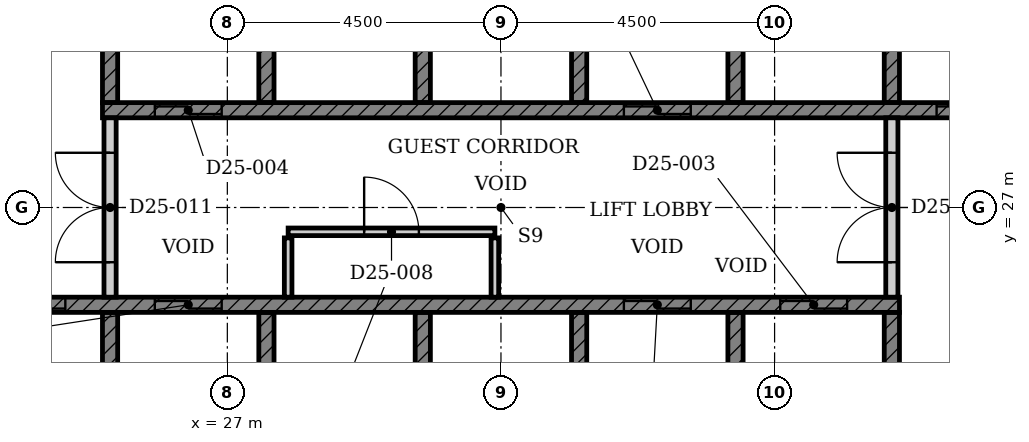
"""IFC4 building model, lengths in metres.
Left out: names, types, materials, properties, quantities, classifications, styles, units other than length and angle.
Written with IfcOpenShell. Run it as: python <this file> out.ifc"""

import sys

from ifc_helpers import new_model, si_unit, direction, frame, frame_2d, origin, place, context, subcontext, project, spatial, polyline, rectangle, outline, extrude, element, fill, save


model = new_model("IFC4")
c1 = context("Model", 3, precision=1e-05, world=origin(), true_north=direction((0.0, 1.0)))
c2 = subcontext(c1, "Body", "Model", "MODEL_VIEW")
j1 = project(units=[si_unit("LENGTHUNIT", "METRE"), si_unit("PLANEANGLEUNIT", "RADIAN")], contexts=[c1])
p1 = place(None, origin())
s1 = spatial("IfcSite", under=j1, at=p1, CompositionType="ELEMENT")
p2 = place(p1, origin())
s2 = spatial("IfcBuilding", under=s1, at=p2, CompositionType="ELEMENT")
p3 = place(p2, frame((0.0, 0.0, 104.4)))
s3 = spatial("IfcBuildingStorey", under=s2, at=p3, CompositionType="ELEMENT", Elevation=104.4)
p4 = place(p3, origin())
e1 = element("IfcWall", 1, at=p4, inside=s3, PredefinedType="SHEAR", context=c2, shape_type="SweptSolid", body=[
    extrude(outline(polyline([(22.375, 22.35), (38.053, 22.35), (38.053, 25.275), (37.803, 25.275), (37.803, 22.65), (35.482, 22.65), (35.482, 25.275), (35.232, 25.275), (35.232, 22.65), (32.911, 22.65), (32.911, 25.275), (32.661, 25.275), (32.661, 22.65), (30.339, 22.65), (30.339, 25.275), (30.089, 25.275), (30.089, 22.65), (27.768, 22.65), (27.768, 25.275), (27.518, 25.275), (27.518, 22.65), (25.197, 22.65), (25.197, 25.275), (24.947, 25.275), (24.947, 22.65), (22.625, 22.65), (22.625, 25.275), (22.375, 25.275), (22.375, 22.35)])), origin(), (0.0, 0.0, 1.0), 3.3),
])
p5 = place(p3, origin())
e2 = element("IfcWall", 2, at=p5, inside=s3, PredefinedType="SHEAR", context=c2, shape_type="SweptSolid", body=[
    extrude(outline(polyline([(24.947, 28.725), (25.197, 28.725), (25.197, 31.35), (27.518, 31.35), (27.518, 28.725), (27.768, 28.725), (27.768, 31.35), (30.089, 31.35), (30.089, 28.725), (30.339, 28.725), (30.339, 31.35), (32.661, 31.35), (32.661, 28.725), (32.911, 28.725), (32.911, 31.35), (35.232, 31.35), (35.232, 28.725), (35.482, 28.725), (35.482, 31.35), (37.803, 31.35), (37.803, 28.725), (38.053, 28.725), (38.053, 31.35), (40.375, 31.35), (40.375, 28.725), (40.625, 28.725), (40.625, 31.65), (24.947, 31.65), (24.947, 28.725)])), origin(), (0.0, 0.0, 1.0), 3.3),
])
p6 = place(p3, frame((22.375, 25.4, 0.0), z_axis=(0.0, 0.0, 1.0), x_axis=(1.0, 0.0, 0.0)))
e3 = element("IfcWall", 3, at=p6, inside=s3, PredefinedType="SHEAR", context=c2, shape_type="SweptSolid", body=[
    extrude(rectangle(XDim=15.678, YDim=0.25, at=frame_2d((7.839, 0.0))), origin(), (0.0, 0.0, 1.0), 3.3),
])
p7 = place(p6, frame((3.432, 0.0, 0.0)))
e4 = element("IfcOpeningElement", 4, at=p7, cuts=e3, PredefinedType="OPENING", context=c2, shape_type="SweptSolid", body=[
    extrude(rectangle(XDim=1.1, YDim=2.1, at=frame_2d((0.55, 1.05))), frame((0.0, 0.135, 0.0), z_axis=(0.0, -1.0, 0.0), x_axis=(1.0, 0.0, 0.0)), (0.0, 0.0, 1.0), 0.27),
])
p8 = place(p6, frame((11.146, 0.0, 0.0)))
e5 = element("IfcOpeningElement", 5, at=p8, cuts=e3, PredefinedType="OPENING", context=c2, shape_type="SweptSolid", body=[
    extrude(rectangle(XDim=1.1, YDim=2.1, at=frame_2d((0.55, 1.05))), frame((0.0, 0.135, 0.0), z_axis=(0.0, -1.0, 0.0), x_axis=(1.0, 0.0, 0.0)), (0.0, 0.0, 1.0), 0.27),
])
p9 = place(p6, frame((13.718, 0.0, 0.0)))
e6 = element("IfcOpeningElement", 6, at=p9, cuts=e3, PredefinedType="OPENING", context=c2, shape_type="SweptSolid", body=[
    extrude(rectangle(XDim=1.1, YDim=2.1, at=frame_2d((0.55, 1.05))), frame((0.0, 0.135, 0.0), z_axis=(0.0, -1.0, 0.0), x_axis=(1.0, 0.0, 0.0)), (0.0, 0.0, 1.0), 0.27),
])
p10 = place(p6, frame((0.861, 0.0, 0.0)))
e7 = element("IfcOpeningElement", 7, at=p10, cuts=e3, PredefinedType="OPENING", context=c2, shape_type="SweptSolid", body=[
    extrude(rectangle(XDim=1.1, YDim=2.1, at=frame_2d((0.55, 1.05))), frame((0.0, 0.135, 0.0), z_axis=(0.0, -1.0, 0.0), x_axis=(1.0, 0.0, 0.0)), (0.0, 0.0, 1.0), 0.27),
])
p11 = place(p3, frame((24.947, 28.6, 0.0), z_axis=(0.0, 0.0, 1.0), x_axis=(1.0, 0.0, 0.0)))
e8 = element("IfcWall", 8, at=p11, inside=s3, PredefinedType="SHEAR", context=c2, shape_type="SweptSolid", body=[
    extrude(rectangle(XDim=15.678, YDim=0.25, at=frame_2d((7.839, 0.0))), origin(), (0.0, 0.0, 1.0), 3.3),
])
p12 = place(p11, frame((0.861, 0.0, 0.0)))
e9 = element("IfcOpeningElement", 9, at=p12, cuts=e8, PredefinedType="OPENING", context=c2, shape_type="SweptSolid", body=[
    extrude(rectangle(XDim=1.1, YDim=2.1, at=frame_2d((0.55, 1.05))), frame((0.0, 0.135, 0.0), z_axis=(0.0, -1.0, 0.0), x_axis=(1.0, 0.0, 0.0)), (0.0, 0.0, 1.0), 0.27),
])
p13 = place(p11, frame((8.575, 0.0, 0.0)))
e10 = element("IfcOpeningElement", 10, at=p13, cuts=e8, PredefinedType="OPENING", context=c2, shape_type="SweptSolid", body=[
    extrude(rectangle(XDim=1.1, YDim=2.1, at=frame_2d((0.55, 1.05))), frame((0.0, 0.135, 0.0), z_axis=(0.0, -1.0, 0.0), x_axis=(1.0, 0.0, 0.0)), (0.0, 0.0, 1.0), 0.27),
])
p14 = place(p11, frame((13.718, 0.0, 0.0)))
e11 = element("IfcOpeningElement", 11, at=p14, cuts=e8, PredefinedType="OPENING", context=c2, shape_type="SweptSolid", body=[
    extrude(rectangle(XDim=1.1, YDim=2.1, at=frame_2d((0.55, 1.05))), frame((0.0, 0.135, 0.0), z_axis=(0.0, -1.0, 0.0), x_axis=(1.0, 0.0, 0.0)), (0.0, 0.0, 1.0), 0.27),
])
p15 = place(p3, frame((28.0, 26.6, 0.0), z_axis=(0.0, 0.0, 1.0), x_axis=(1.0, 0.0, 0.0)))
e12 = element("IfcWall", 12, at=p15, inside=s3, PredefinedType="PARTITIONING", context=c2, shape_type="SweptSolid", body=[
    extrude(rectangle(XDim=3.4, YDim=0.125, at=frame_2d((1.7, 0.0))), origin(), (0.0, 0.0, 1.0), 3.3),
])
p16 = place(p15, frame((1.25, 0.0, 0.0)))
e13 = element("IfcOpeningElement", 13, at=p16, cuts=e12, PredefinedType="OPENING", context=c2, shape_type="SweptSolid", body=[
    extrude(rectangle(XDim=0.9, YDim=2.1, at=frame_2d((0.45, 1.05))), frame((0.0, 0.073, 0.0), z_axis=(0.0, -1.0, 0.0), x_axis=(1.0, 0.0, 0.0)), (0.0, 0.0, 1.0), 0.145),
])
for number, where, z_axis, x_axis in (
    (14, (28.0, 25.525, 0.0), (0.0, 0.0, 1.0), (0.0, 1.0, 0.0)),
    (15, (31.4, 25.525, 0.0), (0.0, 0.0, 1.0), (0.0, 1.0, 0.0)),
):
    element("IfcWall", number, at=place(p3, frame(where, z_axis=z_axis, x_axis=x_axis)), inside=s3, PredefinedType="PARTITIONING", context=c2, shape_type="SweptSolid", body=[
        extrude(rectangle(XDim=0.975, YDim=0.125, at=frame_2d((0.488, 0.0))), origin(), (0.0, 0.0, 1.0), 3.3),
    ])
p17 = place(p3, frame((25.072, 25.525, 0.0), z_axis=(0.0, 0.0, 1.0), x_axis=(0.0, 1.0, 0.0)))
e16 = element("IfcWall", 16, at=p17, inside=s3, PredefinedType="PARTITIONING", context=c2, shape_type="SweptSolid", body=[
    extrude(rectangle(XDim=2.95, YDim=0.2, at=frame_2d((1.475, 0.0))), origin(), (0.0, 0.0, 1.0), 3.3),
])
p18 = place(p17, frame((0.575, 0.0, 0.0)))
e17 = element("IfcOpeningElement", 17, at=p18, cuts=e16, PredefinedType="OPENING", context=c2, shape_type="SweptSolid", body=[
    extrude(rectangle(XDim=1.8, YDim=2.1, at=frame_2d((0.9, 1.05))), frame((0.0, 0.11, 0.0), z_axis=(0.0, -1.0, 0.0), x_axis=(1.0, 0.0, 0.0)), (0.0, 0.0, 1.0), 0.22),
])
p19 = place(p3, frame((37.928, 25.525, 0.0), z_axis=(0.0, 0.0, 1.0), x_axis=(0.0, 1.0, 0.0)))
e18 = element("IfcWall", 18, at=p19, inside=s3, PredefinedType="PARTITIONING", context=c2, shape_type="SweptSolid", body=[
    extrude(rectangle(XDim=2.95, YDim=0.2, at=frame_2d((1.475, 0.0))), origin(), (0.0, 0.0, 1.0), 3.3),
])
p20 = place(p19, frame((0.575, 0.0, 0.0)))
e19 = element("IfcOpeningElement", 19, at=p20, cuts=e18, PredefinedType="OPENING", context=c2, shape_type="SweptSolid", body=[
    extrude(rectangle(XDim=1.8, YDim=2.1, at=frame_2d((0.9, 1.05))), frame((0.0, 0.11, 0.0), z_axis=(0.0, -1.0, 0.0), x_axis=(1.0, 0.0, 0.0)), (0.0, 0.0, 1.0), 0.22),
])
p21 = place(p7, origin())
e20 = element("IfcDoor", 20, at=p21, inside=s3, OperationType="DOUBLE_DOOR_SLIDING", PredefinedType="DOOR", context=c2, shape_type="SweptSolid", body=[
    extrude(rectangle(XDim=1.1, YDim=2.1, at=frame_2d((0.55, 1.05))), frame((0.0, 0.025, 0.0), z_axis=(0.0, -1.0, 0.0), x_axis=(1.0, 0.0, 0.0)), (0.0, 0.0, 1.0), 0.05),
])
fill(e4, e20)
p22 = place(p8, origin())
e21 = element("IfcDoor", 21, at=p22, inside=s3, OperationType="DOUBLE_DOOR_SLIDING", PredefinedType="DOOR", context=c2, shape_type="SweptSolid", body=[
    extrude(rectangle(XDim=1.1, YDim=2.1, at=frame_2d((0.55, 1.05))), frame((0.0, 0.025, 0.0), z_axis=(0.0, -1.0, 0.0), x_axis=(1.0, 0.0, 0.0)), (0.0, 0.0, 1.0), 0.05),
])
fill(e5, e21)
p23 = place(p9, origin())
e22 = element("IfcDoor", 22, at=p23, inside=s3, OperationType="DOUBLE_DOOR_SLIDING", PredefinedType="DOOR", context=c2, shape_type="SweptSolid", body=[
    extrude(rectangle(XDim=1.1, YDim=2.1, at=frame_2d((0.55, 1.05))), frame((0.0, 0.025, 0.0), z_axis=(0.0, -1.0, 0.0), x_axis=(1.0, 0.0, 0.0)), (0.0, 0.0, 1.0), 0.05),
])
fill(e6, e22)
p24 = place(p12, origin())
e23 = element("IfcDoor", 23, at=p24, inside=s3, OperationType="DOUBLE_DOOR_SLIDING", PredefinedType="DOOR", context=c2, shape_type="SweptSolid", body=[
    extrude(rectangle(XDim=1.1, YDim=2.1, at=frame_2d((0.55, 1.05))), frame((0.0, 0.025, 0.0), z_axis=(0.0, -1.0, 0.0), x_axis=(1.0, 0.0, 0.0)), (0.0, 0.0, 1.0), 0.05),
])
fill(e9, e23)
p25 = place(p13, origin())
e24 = element("IfcDoor", 24, at=p25, inside=s3, OperationType="DOUBLE_DOOR_SLIDING", PredefinedType="DOOR", context=c2, shape_type="SweptSolid", body=[
    extrude(rectangle(XDim=1.1, YDim=2.1, at=frame_2d((0.55, 1.05))), frame((0.0, 0.025, 0.0), z_axis=(0.0, -1.0, 0.0), x_axis=(1.0, 0.0, 0.0)), (0.0, 0.0, 1.0), 0.05),
])
fill(e10, e24)
p26 = place(p10, origin())
e25 = element("IfcDoor", 25, at=p26, inside=s3, OperationType="DOUBLE_DOOR_SLIDING", PredefinedType="DOOR", context=c2, shape_type="SweptSolid", body=[
    extrude(rectangle(XDim=1.1, YDim=2.1, at=frame_2d((0.55, 1.05))), frame((0.0, 0.025, 0.0), z_axis=(0.0, -1.0, 0.0), x_axis=(1.0, 0.0, 0.0)), (0.0, 0.0, 1.0), 0.05),
])
fill(e7, e25)
p27 = place(p14, origin())
e26 = element("IfcDoor", 26, at=p27, inside=s3, OperationType="DOUBLE_DOOR_SLIDING", PredefinedType="DOOR", context=c2, shape_type="SweptSolid", body=[
    extrude(rectangle(XDim=1.1, YDim=2.1, at=frame_2d((0.55, 1.05))), frame((0.0, 0.025, 0.0), z_axis=(0.0, -1.0, 0.0), x_axis=(1.0, 0.0, 0.0)), (0.0, 0.0, 1.0), 0.05),
])
fill(e11, e26)
p28 = place(p16, origin())
e27 = element("IfcDoor", 27, at=p28, inside=s3, OperationType="SINGLE_SWING_LEFT", PredefinedType="DOOR", context=c2, shape_type="SweptSolid", body=[
    extrude(rectangle(XDim=0.9, YDim=2.1, at=frame_2d((0.45, 1.05))), frame((0.0, 0.025, 0.0), z_axis=(0.0, -1.0, 0.0), x_axis=(1.0, 0.0, 0.0)), (0.0, 0.0, 1.0), 0.05),
])
fill(e13, e27)
p29 = place(p18, origin())
e28 = element("IfcDoor", 28, at=p29, inside=s3, OperationType="DOUBLE_DOOR_SINGLE_SWING", PredefinedType="DOOR", context=c2, shape_type="SweptSolid", body=[
    extrude(rectangle(XDim=1.8, YDim=2.1, at=frame_2d((0.9, 1.05))), frame((0.0, 0.025, 0.0), z_axis=(0.0, -1.0, 0.0), x_axis=(1.0, 0.0, 0.0)), (0.0, 0.0, 1.0), 0.05),
])
fill(e17, e28)
p30 = place(p20, origin())
e29 = element("IfcDoor", 29, at=p30, inside=s3, OperationType="DOUBLE_DOOR_SINGLE_SWING", PredefinedType="DOOR", context=c2, shape_type="SweptSolid", body=[
    extrude(rectangle(XDim=1.8, YDim=2.1, at=frame_2d((0.9, 1.05))), frame((0.0, 0.025, 0.0), z_axis=(0.0, -1.0, 0.0), x_axis=(1.0, 0.0, 0.0)), (0.0, 0.0, 1.0), 0.05),
])
fill(e19, e29)
save(model, sys.argv[1])
